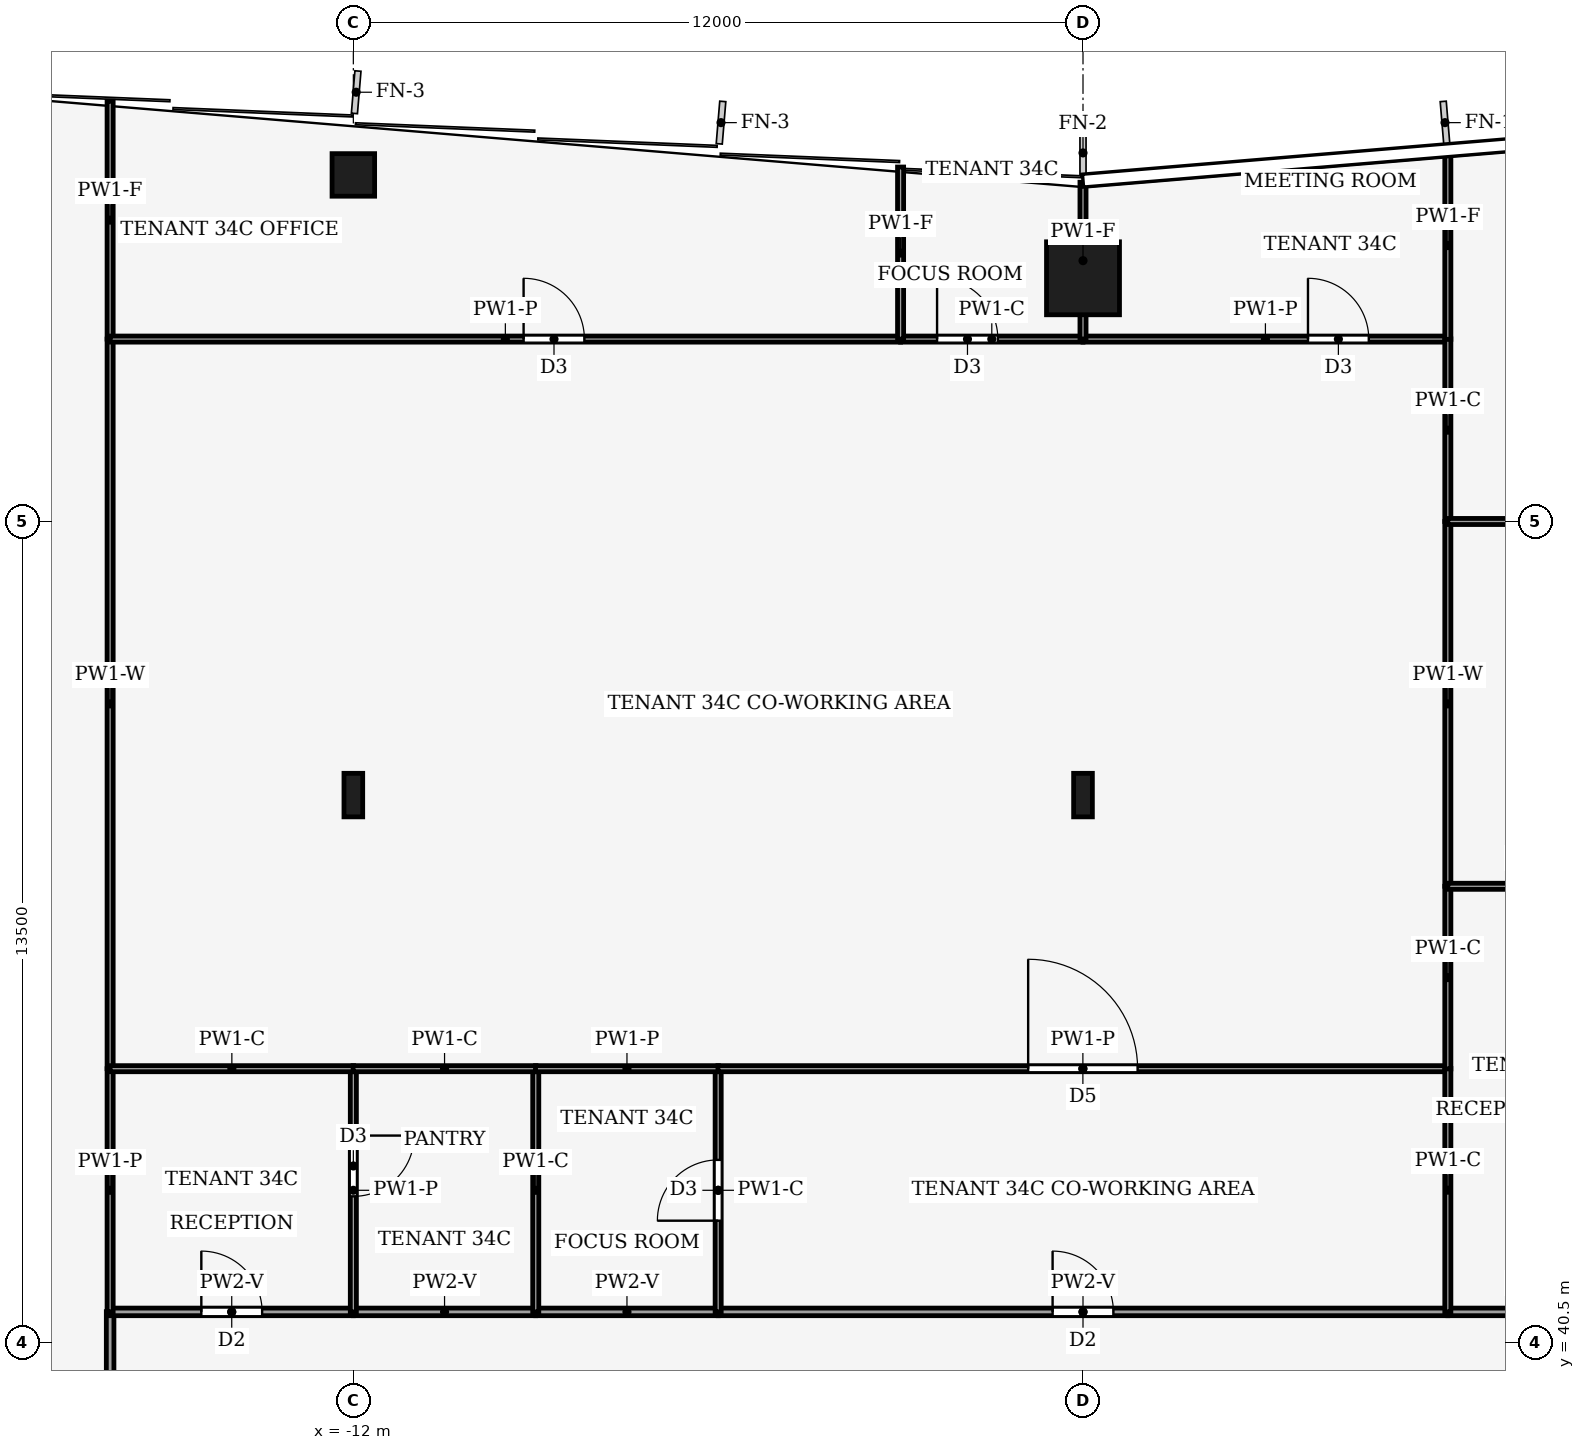
"""IFC4 building model, lengths in metres.
Left out: names, types, materials, properties, quantities, classifications, styles, units other than length and angle.
Written with IfcOpenShell. Run it as: python <this file> out.ifc"""

import sys

from ifc_helpers import new_model, si_unit, direction, frame, frame_2d, origin, origin_2d, place, context, subcontext, project, spatial, rectangle, hollow_rectangle, i_section, extrude, element, fill, save


model = new_model("IFC4")
c1 = context("Model", 3, precision=1e-05, world=origin(), true_north=direction((0.0, 1.0)))
c2 = subcontext(c1, "Body", "Model", "MODEL_VIEW")
j1 = project(units=[si_unit("LENGTHUNIT", "METRE"), si_unit("PLANEANGLEUNIT", "RADIAN")], contexts=[c1])
p1 = place(None, origin())
s1 = spatial("IfcSite", under=j1, at=p1, CompositionType="ELEMENT")
p2 = place(p1, origin())
s2 = spatial("IfcBuilding", under=s1, at=p2, CompositionType="ELEMENT")
p3 = place(p2, frame((0.0, 0.0, 150.0)))
s3 = spatial("IfcBuildingStorey", under=s2, at=p3, CompositionType="ELEMENT", Elevation=150.0)
p4 = place(p3, frame((0.0, 58.0, 0.0), z_axis=(0.0, 0.0, 1.0), x_axis=(1.0, 0.0, 0.0)))
e1 = element("IfcColumn", 1, at=p4, inside=s3, PredefinedType="COLUMN", context=c2, shape_type="SweptSolid", body=[
    extrude(hollow_rectangle(XDim=1.2, YDim=1.2, WallThickness=0.07, at=origin_2d()), origin(), (0.0, 0.0, 1.0), 4.0),
])
p5 = place(p3, frame((-12.0, 59.7, 0.0), z_axis=(0.0, 0.0, 1.0), x_axis=(1.0, 0.0, 0.0)))
e2 = element("IfcColumn", 2, at=p5, inside=s3, PredefinedType="COLUMN", context=c2, shape_type="SweptSolid", body=[
    extrude(hollow_rectangle(XDim=0.7, YDim=0.7, WallThickness=0.03, at=origin_2d()), origin(), (0.0, 0.0, 1.0), 4.0),
])
for number, where, z_axis, x_axis in (
    (3, (-12.0, 49.5, 0.0), (0.0, 0.0, 1.0), (1.0, 0.0, 0.0)),
    (4, (0.0, 49.5, 0.0), (0.0, 0.0, 1.0), (1.0, 0.0, 0.0)),
):
    element("IfcColumn", number, at=place(p3, frame(where, z_axis=z_axis, x_axis=x_axis)), inside=s3, PredefinedType="COLUMN", context=c2, shape_type="SweptSolid", body=[
        extrude(i_section(OverallWidth=0.308, OverallDepth=0.716, WebThickness=0.021, FlangeThickness=0.04, FilletRadius=0.027, at=origin_2d()), origin(), (0.0, 0.0, 1.0), 4.0),
    ])
p6 = place(p3, frame((-16.0, 41.004, 0.0), z_axis=(0.0, 0.0, 1.0), x_axis=(0.0, -1.0, 0.0)))
e5 = element("IfcWall", 5, at=p6, inside=s3, PredefinedType="PARTITIONING", context=c2, shape_type="SweptSolid", body=[
    extrude(rectangle(XDim=5.004, YDim=0.125, at=frame_2d((2.502, 0.0))), origin(), (0.0, 0.0, 1.0), 3.14),
])
p7 = place(p6, frame((1.602, 0.0, 0.0)))
e6 = element("IfcOpeningElement", 6, at=p7, cuts=e5, PredefinedType="OPENING", context=c2, shape_type="SweptSolid", body=[
    extrude(rectangle(XDim=1.8, YDim=2.1, at=frame_2d((0.9, 1.05))), frame((0.0, 0.073, 0.0), z_axis=(0.0, -1.0, 0.0), x_axis=(1.0, 0.0, 0.0)), (0.0, 0.0, 1.0), 0.145),
])
p8 = place(p3, frame((-16.0, 41.0, 0.0), z_axis=(0.0, 0.0, 1.0), x_axis=(1.0, 0.0, 0.0)))
e7 = element("IfcWall", 7, at=p8, inside=s3, PredefinedType="PARTITIONING", context=c2, shape_type="SweptSolid", body=[
    extrude(rectangle(XDim=4.0, YDim=0.125, at=frame_2d((2.0, 0.0))), origin(), (0.0, 0.0, 1.0), 3.44),
])
p9 = place(p8, frame((1.5, 0.0, 0.0)))
e8 = element("IfcOpeningElement", 8, at=p9, cuts=e7, PredefinedType="OPENING", context=c2, shape_type="SweptSolid", body=[
    extrude(rectangle(XDim=1.0, YDim=2.1, at=frame_2d((0.5, 1.05))), frame((0.0, 0.073, 0.0), z_axis=(0.0, -1.0, 0.0), x_axis=(1.0, 0.0, 0.0)), (0.0, 0.0, 1.0), 0.145),
])
for number, where, z_axis, x_axis in (
    (9, (-9.0, 41.0, 0.0), (0.0, 0.0, 1.0), (-1.0, 0.0, 0.0)),
    (10, (-6.0, 41.0, 0.0), (0.0, 0.0, 1.0), (-1.0, 0.0, 0.0)),
):
    element("IfcWall", number, at=place(p3, frame(where, z_axis=z_axis, x_axis=x_axis)), inside=s3, PredefinedType="PARTITIONING", context=c2, shape_type="SweptSolid", body=[
        extrude(rectangle(XDim=3.0, YDim=0.125, at=frame_2d((1.5, 0.0))), origin(), (0.0, 0.0, 1.0), 3.44),
    ])
p10 = place(p3, frame((-6.0, 41.0, 0.0), z_axis=(0.0, 0.0, 1.0), x_axis=(1.0, 0.0, 0.0)))
e11 = element("IfcWall", 11, at=p10, inside=s3, PredefinedType="PARTITIONING", context=c2, shape_type="SweptSolid", body=[
    extrude(rectangle(XDim=12.0, YDim=0.125, at=frame_2d((6.0, 0.0))), origin(), (0.0, 0.0, 1.0), 3.44),
])
p11 = place(p10, frame((5.5, 0.0, 0.0)))
e12 = element("IfcOpeningElement", 12, at=p11, cuts=e11, PredefinedType="OPENING", context=c2, shape_type="SweptSolid", body=[
    extrude(rectangle(XDim=1.0, YDim=2.1, at=frame_2d((0.5, 1.05))), frame((0.0, 0.073, 0.0), z_axis=(0.0, -1.0, 0.0), x_axis=(1.0, 0.0, 0.0)), (0.0, 0.0, 1.0), 0.145),
])
p12 = place(p3, frame((6.0, 41.0, 0.0), z_axis=(0.0, 0.0, 1.0), x_axis=(1.0, 0.0, 0.0)))
e13 = element("IfcWall", 13, at=p12, inside=s3, PredefinedType="PARTITIONING", context=c2, shape_type="SweptSolid", body=[
    extrude(rectangle(XDim=3.0, YDim=0.125, at=frame_2d((1.5, 0.0))), origin(), (0.0, 0.0, 1.0), 3.44),
])
p13 = place(p12, frame((1.0, 0.0, 0.0)))
e14 = element("IfcOpeningElement", 14, at=p13, cuts=e13, PredefinedType="OPENING", context=c2, shape_type="SweptSolid", body=[
    extrude(rectangle(XDim=1.0, YDim=2.1, at=frame_2d((0.5, 1.05))), frame((0.0, 0.073, 0.0), z_axis=(0.0, -1.0, 0.0), x_axis=(1.0, 0.0, 0.0)), (0.0, 0.0, 1.0), 0.145),
])
p14 = place(p3, frame((-16.0, 41.0, 0.0), z_axis=(0.0, 0.0, 1.0), x_axis=(0.0, 1.0, 0.0)))
e15 = element("IfcWall", 15, at=p14, inside=s3, PredefinedType="PARTITIONING", context=c2, shape_type="SweptSolid", body=[
    extrude(rectangle(XDim=4.0, YDim=0.1, at=frame_2d((2.0, 0.0))), origin(), (0.0, 0.0, 1.0), 3.44),
])
p15 = place(p3, frame((-16.0, 45.0, 0.0), z_axis=(0.0, 0.0, 1.0), x_axis=(0.0, 1.0, 0.0)))
e16 = element("IfcWall", 16, at=p15, inside=s3, PredefinedType="PARTITIONING", context=c2, shape_type="SweptSolid", body=[
    extrude(rectangle(XDim=12.0, YDim=0.1, at=frame_2d((6.0, 0.0))), origin(), (0.0, 0.0, 1.0), 3.24),
])
p16 = place(p3, frame((-16.0, 57.0, 0.0), z_axis=(0.0, 0.0, 1.0), x_axis=(0.0, 1.0, 0.0)))
e17 = element("IfcWall", 17, at=p16, inside=s3, PredefinedType="PARTITIONING", context=c2, shape_type="SweptSolid", body=[
    extrude(rectangle(XDim=3.913, YDim=0.1, at=frame_2d((1.957, 0.0))), origin(), (0.0, 0.0, 1.0), 3.04),
])
p17 = place(p3, frame((-12.0, 45.0, 0.0), z_axis=(0.0, 0.0, 1.0), x_axis=(0.0, -1.0, 0.0)))
e18 = element("IfcWall", 18, at=p17, inside=s3, PredefinedType="PARTITIONING", context=c2, shape_type="SweptSolid", body=[
    extrude(rectangle(XDim=4.0, YDim=0.1, at=frame_2d((2.0, 0.0))), origin(), (0.0, 0.0, 1.0), 3.44),
])
p18 = place(p17, frame((1.1, 0.0, 0.0)))
e19 = element("IfcOpeningElement", 19, at=p18, cuts=e18, PredefinedType="OPENING", context=c2, shape_type="SweptSolid", body=[
    extrude(rectangle(XDim=1.0, YDim=2.1, at=frame_2d((0.5, 1.05))), frame((0.0, 0.06, 0.0), z_axis=(0.0, -1.0, 0.0), x_axis=(1.0, 0.0, 0.0)), (0.0, 0.0, 1.0), 0.12),
])
p19 = place(p3, frame((-11.996, 45.0, 0.0), z_axis=(0.0, 0.0, 1.0), x_axis=(-1.0, 0.0, 0.0)))
e20 = element("IfcWall", 20, at=p19, inside=s3, PredefinedType="PARTITIONING", context=c2, shape_type="SweptSolid", body=[
    extrude(rectangle(XDim=4.004, YDim=0.1, at=frame_2d((2.002, 0.0))), origin(), (0.0, 0.0, 1.0), 3.87),
])
p20 = place(p3, frame((-9.0, 41.0, 0.0), z_axis=(0.0, 0.0, 1.0), x_axis=(0.0, 1.0, 0.0)))
e21 = element("IfcWall", 21, at=p20, inside=s3, PredefinedType="PARTITIONING", context=c2, shape_type="SweptSolid", body=[
    extrude(rectangle(XDim=4.0, YDim=0.1, at=frame_2d((2.0, 0.0))), origin(), (0.0, 0.0, 1.0), 3.87),
])
p21 = place(p3, frame((-8.996, 45.0, 0.0), z_axis=(0.0, 0.0, 1.0), x_axis=(-1.0, 0.0, 0.0)))
e22 = element("IfcWall", 22, at=p21, inside=s3, PredefinedType="PARTITIONING", context=c2, shape_type="SweptSolid", body=[
    extrude(rectangle(XDim=3.008, YDim=0.1, at=frame_2d((1.504, 0.0))), origin(), (0.0, 0.0, 1.0), 3.87),
])
p22 = place(p3, frame((-6.0, 41.0, 0.0), z_axis=(0.0, 0.0, 1.0), x_axis=(0.0, 1.0, 0.0)))
e23 = element("IfcWall", 23, at=p22, inside=s3, PredefinedType="PARTITIONING", context=c2, shape_type="SweptSolid", body=[
    extrude(rectangle(XDim=4.0, YDim=0.1, at=frame_2d((2.0, 0.0))), origin(), (0.0, 0.0, 1.0), 3.87),
])
p23 = place(p22, frame((1.5, 0.0, 0.0)))
e24 = element("IfcOpeningElement", 24, at=p23, cuts=e23, PredefinedType="OPENING", context=c2, shape_type="SweptSolid", body=[
    extrude(rectangle(XDim=1.0, YDim=2.1, at=frame_2d((0.5, 1.05))), frame((0.0, 0.06, 0.0), z_axis=(0.0, -1.0, 0.0), x_axis=(1.0, 0.0, 0.0)), (0.0, 0.0, 1.0), 0.12),
])
p24 = place(p3, frame((-5.996, 45.0, 0.0), z_axis=(0.0, 0.0, 1.0), x_axis=(-1.0, 0.0, 0.0)))
e25 = element("IfcWall", 25, at=p24, inside=s3, PredefinedType="PARTITIONING", context=c2, shape_type="SweptSolid", body=[
    extrude(rectangle(XDim=3.008, YDim=0.1, at=frame_2d((1.504, 0.0))), origin(), (0.0, 0.0, 1.0), 3.44),
])
p25 = place(p3, frame((-6.004, 45.0, 0.0), z_axis=(0.0, 0.0, 1.0), x_axis=(1.0, 0.0, 0.0)))
e26 = element("IfcWall", 26, at=p25, inside=s3, PredefinedType="PARTITIONING", context=c2, shape_type="SweptSolid", body=[
    extrude(rectangle(XDim=12.004, YDim=0.1, at=frame_2d((6.002, 0.0))), origin(), (0.0, 0.0, 1.0), 3.44),
])
p26 = place(p25, frame((5.102, 0.0, 0.0)))
e27 = element("IfcOpeningElement", 27, at=p26, cuts=e26, PredefinedType="OPENING", context=c2, shape_type="SweptSolid", body=[
    extrude(rectangle(XDim=1.8, YDim=2.1, at=frame_2d((0.9, 1.05))), frame((0.0, 0.06, 0.0), z_axis=(0.0, -1.0, 0.0), x_axis=(1.0, 0.0, 0.0)), (0.0, 0.0, 1.0), 0.12),
])
p27 = place(p3, frame((6.0, 41.0, 0.0), z_axis=(0.0, 0.0, 1.0), x_axis=(0.0, 1.0, 0.0)))
e28 = element("IfcWall", 28, at=p27, inside=s3, PredefinedType="PARTITIONING", context=c2, shape_type="SweptSolid", body=[
    extrude(rectangle(XDim=4.004, YDim=0.1, at=frame_2d((2.002, 0.0))), origin(), (0.0, 0.0, 1.0), 3.87),
])
p28 = place(p3, frame((-16.0, 57.0, 0.0), z_axis=(0.0, 0.0, 1.0), x_axis=(1.0, 0.0, 0.0)))
e29 = element("IfcWall", 29, at=p28, inside=s3, PredefinedType="PARTITIONING", context=c2, shape_type="SweptSolid", body=[
    extrude(rectangle(XDim=13.0, YDim=0.1, at=frame_2d((6.5, 0.0))), origin(), (0.0, 0.0, 1.0), 3.44),
])
p29 = place(p28, frame((6.8, 0.0, 0.0)))
e30 = element("IfcOpeningElement", 30, at=p29, cuts=e29, PredefinedType="OPENING", context=c2, shape_type="SweptSolid", body=[
    extrude(rectangle(XDim=1.0, YDim=2.1, at=frame_2d((0.5, 1.05))), frame((0.0, 0.06, 0.0), z_axis=(0.0, -1.0, 0.0), x_axis=(1.0, 0.0, 0.0)), (0.0, 0.0, 1.0), 0.12),
])
p30 = place(p3, frame((-3.0, 57.0, 0.0), z_axis=(0.0, 0.0, 1.0), x_axis=(1.0, 0.0, 0.0)))
e31 = element("IfcWall", 31, at=p30, inside=s3, PredefinedType="PARTITIONING", context=c2, shape_type="SweptSolid", body=[
    extrude(rectangle(XDim=3.0, YDim=0.1, at=frame_2d((1.5, 0.0))), origin(), (0.0, 0.0, 1.0), 3.87),
])
p31 = place(p30, frame((0.6, 0.0, 0.0)))
e32 = element("IfcOpeningElement", 32, at=p31, cuts=e31, PredefinedType="OPENING", context=c2, shape_type="SweptSolid", body=[
    extrude(rectangle(XDim=1.0, YDim=2.1, at=frame_2d((0.5, 1.05))), frame((0.0, 0.06, 0.0), z_axis=(0.0, -1.0, 0.0), x_axis=(1.0, 0.0, 0.0)), (0.0, 0.0, 1.0), 0.12),
])
p32 = place(p3, frame((0.0, 57.0, 0.0), z_axis=(0.0, 0.0, 1.0), x_axis=(1.0, 0.0, 0.0)))
e33 = element("IfcWall", 33, at=p32, inside=s3, PredefinedType="PARTITIONING", context=c2, shape_type="SweptSolid", body=[
    extrude(rectangle(XDim=6.0, YDim=0.1, at=frame_2d((3.0, 0.0))), origin(), (0.0, 0.0, 1.0), 3.44),
])
p33 = place(p32, frame((3.7, 0.0, 0.0)))
e34 = element("IfcOpeningElement", 34, at=p33, cuts=e33, PredefinedType="OPENING", context=c2, shape_type="SweptSolid", body=[
    extrude(rectangle(XDim=1.0, YDim=2.1, at=frame_2d((0.5, 1.05))), frame((0.0, 0.06, 0.0), z_axis=(0.0, -1.0, 0.0), x_axis=(1.0, 0.0, 0.0)), (0.0, 0.0, 1.0), 0.12),
])
p34 = place(p3, frame((6.0, 44.996, 0.0), z_axis=(0.0, 0.0, 1.0), x_axis=(0.0, 1.0, 0.0)))
e35 = element("IfcWall", 35, at=p34, inside=s3, PredefinedType="PARTITIONING", context=c2, shape_type="SweptSolid", body=[
    extrude(rectangle(XDim=3.004, YDim=0.1, at=frame_2d((1.502, 0.0))), origin(), (0.0, 0.0, 1.0), 3.87),
])
p35 = place(p3, frame((6.0, 48.0, 0.0), z_axis=(0.0, 0.0, 1.0), x_axis=(0.0, 1.0, 0.0)))
e36 = element("IfcWall", 36, at=p35, inside=s3, PredefinedType="PARTITIONING", context=c2, shape_type="SweptSolid", body=[
    extrude(rectangle(XDim=6.0, YDim=0.1, at=frame_2d((3.0, 0.0))), origin(), (0.0, 0.0, 1.0), 3.24),
])
p36 = place(p3, frame((6.0, 54.0, 0.0), z_axis=(0.0, 0.0, 1.0), x_axis=(0.0, 1.0, 0.0)))
e37 = element("IfcWall", 37, at=p36, inside=s3, PredefinedType="PARTITIONING", context=c2, shape_type="SweptSolid", body=[
    extrude(rectangle(XDim=3.004, YDim=0.1, at=frame_2d((1.502, 0.0))), origin(), (0.0, 0.0, 1.0), 3.87),
])
p37 = place(p3, frame((-3.0, 57.0, 0.0), z_axis=(0.0, 0.0, 1.0), x_axis=(0.0, 1.0, 0.0)))
e38 = element("IfcWall", 38, at=p37, inside=s3, PredefinedType="PARTITIONING", context=c2, shape_type="SweptSolid", body=[
    extrude(rectangle(XDim=2.83, YDim=0.1, at=frame_2d((1.415, 0.0))), origin(), (0.0, 0.0, 1.0), 3.04),
])
p38 = place(p3, frame((0.0, 57.0, 0.0), z_axis=(0.0, 0.0, 1.0), x_axis=(0.0, 1.0, 0.0)))
e39 = element("IfcWall", 39, at=p38, inside=s3, PredefinedType="PARTITIONING", context=c2, shape_type="SweptSolid", body=[
    extrude(rectangle(XDim=2.58, YDim=0.1, at=frame_2d((1.29, 0.0))), origin(), (0.0, 0.0, 1.0), 3.04),
])
p39 = place(p3, frame((6.0, 56.996, 0.0), z_axis=(0.0, 0.0, 1.0), x_axis=(0.0, 1.0, 0.0)))
e40 = element("IfcWall", 40, at=p39, inside=s3, PredefinedType="PARTITIONING", context=c2, shape_type="SweptSolid", body=[
    extrude(rectangle(XDim=3.084, YDim=0.1, at=frame_2d((1.542, 0.0))), origin(), (0.0, 0.0, 1.0), 3.04),
])
p40 = place(p3, frame((6.0, 48.0, 0.0), z_axis=(0.0, 0.0, 1.0), x_axis=(1.0, 0.0, 0.0)))
e41 = element("IfcWall", 41, at=p40, inside=s3, PredefinedType="PARTITIONING", context=c2, shape_type="SweptSolid", body=[
    extrude(rectangle(XDim=3.004, YDim=0.1, at=frame_2d((1.502, 0.0))), origin(), (0.0, 0.0, 1.0), 3.44),
])
p41 = place(p40, frame((1.002, 0.0, 0.0)))
e42 = element("IfcOpeningElement", 42, at=p41, cuts=e41, PredefinedType="OPENING", context=c2, shape_type="SweptSolid", body=[
    extrude(rectangle(XDim=1.0, YDim=2.1, at=frame_2d((0.5, 1.05))), frame((0.0, 0.06, 0.0), z_axis=(0.0, -1.0, 0.0), x_axis=(1.0, 0.0, 0.0)), (0.0, 0.0, 1.0), 0.12),
])
p42 = place(p3, frame((6.0, 54.0, 0.0), z_axis=(0.0, 0.0, 1.0), x_axis=(1.0, 0.0, 0.0)))
e43 = element("IfcWall", 43, at=p42, inside=s3, PredefinedType="PARTITIONING", context=c2, shape_type="SweptSolid", body=[
    extrude(rectangle(XDim=10.0, YDim=0.1, at=frame_2d((5.0, 0.0))), origin(), (0.0, 0.0, 1.0), 3.44),
])
p43 = place(p42, frame((4.5, 0.0, 0.0)))
e44 = element("IfcOpeningElement", 44, at=p43, cuts=e43, PredefinedType="OPENING", context=c2, shape_type="SweptSolid", body=[
    extrude(rectangle(XDim=1.0, YDim=2.1, at=frame_2d((0.5, 1.05))), frame((0.0, 0.06, 0.0), z_axis=(0.0, -1.0, 0.0), x_axis=(1.0, 0.0, 0.0)), (0.0, 0.0, 1.0), 0.12),
])
p44 = place(p9, origin())
e45 = element("IfcDoor", 45, at=p44, inside=s3, OperationType="SINGLE_SWING_LEFT", PredefinedType="DOOR", context=c2, shape_type="SweptSolid", body=[
    extrude(rectangle(XDim=1.0, YDim=2.1, at=frame_2d((0.5, 1.05))), frame((0.0, 0.025, 0.0), z_axis=(0.0, -1.0, 0.0), x_axis=(1.0, 0.0, 0.0)), (0.0, 0.0, 1.0), 0.05),
])
fill(e8, e45)
p45 = place(p11, origin())
e46 = element("IfcDoor", 46, at=p45, inside=s3, OperationType="SINGLE_SWING_RIGHT", PredefinedType="DOOR", context=c2, shape_type="SweptSolid", body=[
    extrude(rectangle(XDim=1.0, YDim=2.1, at=frame_2d((0.5, 1.05))), frame((0.0, 0.025, 0.0), z_axis=(0.0, -1.0, 0.0), x_axis=(1.0, 0.0, 0.0)), (0.0, 0.0, 1.0), 0.05),
])
fill(e12, e46)
p46 = place(p18, origin())
e47 = element("IfcDoor", 47, at=p46, inside=s3, OperationType="SINGLE_SWING_LEFT", PredefinedType="DOOR", context=c2, shape_type="SweptSolid", body=[
    extrude(rectangle(XDim=1.0, YDim=2.1, at=frame_2d((0.5, 1.05))), frame((0.0, 0.025, 0.0), z_axis=(0.0, -1.0, 0.0), x_axis=(1.0, 0.0, 0.0)), (0.0, 0.0, 1.0), 0.05),
])
fill(e19, e47)
p47 = place(p23, origin())
e48 = element("IfcDoor", 48, at=p47, inside=s3, OperationType="SINGLE_SWING_LEFT", PredefinedType="DOOR", context=c2, shape_type="SweptSolid", body=[
    extrude(rectangle(XDim=1.0, YDim=2.1, at=frame_2d((0.5, 1.05))), frame((0.0, 0.025, 0.0), z_axis=(0.0, -1.0, 0.0), x_axis=(1.0, 0.0, 0.0)), (0.0, 0.0, 1.0), 0.05),
])
fill(e24, e48)
p48 = place(p26, origin())
e49 = element("IfcDoor", 49, at=p48, inside=s3, OperationType="DOUBLE_DOOR_SINGLE_SWING", PredefinedType="DOOR", context=c2, shape_type="SweptSolid", body=[
    extrude(rectangle(XDim=1.8, YDim=2.1, at=frame_2d((0.9, 1.05))), frame((0.0, 0.025, 0.0), z_axis=(0.0, -1.0, 0.0), x_axis=(1.0, 0.0, 0.0)), (0.0, 0.0, 1.0), 0.05),
])
fill(e27, e49)
p49 = place(p29, origin())
e50 = element("IfcDoor", 50, at=p49, inside=s3, OperationType="SINGLE_SWING_RIGHT", PredefinedType="DOOR", context=c2, shape_type="SweptSolid", body=[
    extrude(rectangle(XDim=1.0, YDim=2.1, at=frame_2d((0.5, 1.05))), frame((0.0, 0.025, 0.0), z_axis=(0.0, -1.0, 0.0), x_axis=(1.0, 0.0, 0.0)), (0.0, 0.0, 1.0), 0.05),
])
fill(e30, e50)
p50 = place(p31, origin())
e51 = element("IfcDoor", 51, at=p50, inside=s3, OperationType="SINGLE_SWING_LEFT", PredefinedType="DOOR", context=c2, shape_type="SweptSolid", body=[
    extrude(rectangle(XDim=1.0, YDim=2.1, at=frame_2d((0.5, 1.05))), frame((0.0, 0.025, 0.0), z_axis=(0.0, -1.0, 0.0), x_axis=(1.0, 0.0, 0.0)), (0.0, 0.0, 1.0), 0.05),
])
fill(e32, e51)
p51 = place(p33, origin())
e52 = element("IfcDoor", 52, at=p51, inside=s3, OperationType="SINGLE_SWING_RIGHT", PredefinedType="DOOR", context=c2, shape_type="SweptSolid", body=[
    extrude(rectangle(XDim=1.0, YDim=2.1, at=frame_2d((0.5, 1.05))), frame((0.0, 0.025, 0.0), z_axis=(0.0, -1.0, 0.0), x_axis=(1.0, 0.0, 0.0)), (0.0, 0.0, 1.0), 0.05),
])
fill(e34, e52)
save(model, sys.argv[1])
